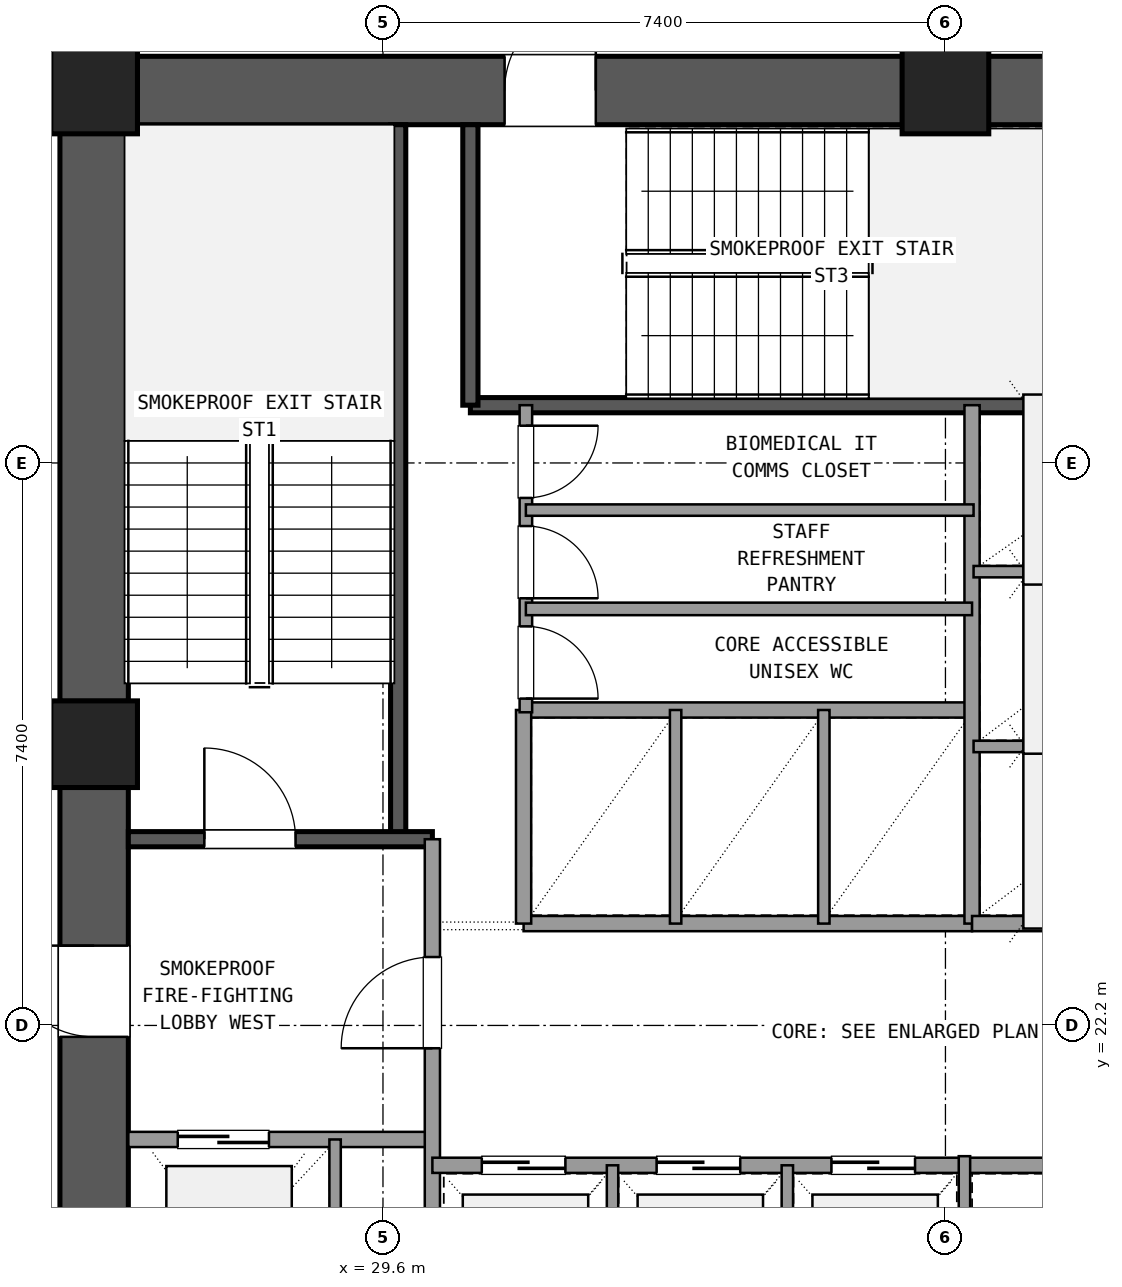
"""IFC4 building model, lengths in metres.
Left out: names, types, materials, properties, quantities, classifications, styles, units other than length and angle.
Written with IfcOpenShell. Run it as: python <this file> out.ifc"""

import sys

from ifc_helpers import new_model, si_unit, direction, frame, frame_2d, origin, origin_2d, place, context, subcontext, project, spatial, rectangle, extrude, element, fill, save


model = new_model("IFC4")
c1 = context("Model", 3, precision=1e-05, world=origin(), true_north=direction((0.0, 1.0)))
c2 = subcontext(c1, "Body", "Model", "MODEL_VIEW")
j1 = project(units=[si_unit("LENGTHUNIT", "METRE"), si_unit("PLANEANGLEUNIT", "RADIAN")], contexts=[c1])
p1 = place(None, origin())
s1 = spatial("IfcSite", under=j1, at=p1, CompositionType="ELEMENT")
p2 = place(p1, origin())
s2 = spatial("IfcBuilding", under=s1, at=p2, CompositionType="ELEMENT")
p3 = place(p2, frame((0.0, 0.0, 9.9)))
s3 = spatial("IfcBuildingStorey", under=s2, at=p3, CompositionType="ELEMENT", Elevation=9.9)
for number, where, z_axis, x_axis in (
    (1, (37.0, 34.5, 0.0), (0.0, 0.0, 1.0), (1.0, 0.0, 0.0)),
    (2, (25.8, 34.5, 0.0), (0.0, 0.0, 1.0), (1.0, 0.0, 0.0)),
    (3, (25.8, 25.9, 0.0), (0.0, 0.0, 1.0), (1.0, 0.0, 0.0)),
):
    element("IfcColumn", number, at=place(p3, frame(where, z_axis=z_axis, x_axis=x_axis)), inside=s3, PredefinedType="COLUMN", context=c2, shape_type="SweptSolid", body=[
        extrude(rectangle(XDim=1.14, YDim=1.14, at=origin_2d()), origin(), (0.0, 0.0, 1.0), 4.5),
    ])
p4 = place(p3, frame((47.635, 34.5, 0.0), z_axis=(0.0, 0.0, 1.0), x_axis=(-1.0, 0.0, 0.0)))
e4 = element("IfcWall", 4, at=p4, inside=s3, PredefinedType="SHEAR", context=c2, shape_type="SweptSolid", body=[
    extrude(rectangle(XDim=10.07, YDim=0.9, at=frame_2d((5.035, 0.0))), origin(), (0.0, 0.0, 1.0), 4.2),
])
p5 = place(p4, frame((4.535, 0.0, 0.0)))
e5 = element("IfcOpeningElement", 5, at=p5, cuts=e4, PredefinedType="OPENING", context=c2, shape_type="SweptSolid", body=[
    extrude(rectangle(XDim=1.6, YDim=2.2, at=frame_2d((0.8, 1.1))), frame((0.0, 0.46, 0.0), z_axis=(0.0, -1.0, 0.0), x_axis=(1.0, 0.0, 0.0)), (0.0, 0.0, 1.0), 0.92),
])
p6 = place(p3, frame((36.435, 34.5, 0.0), z_axis=(0.0, 0.0, 1.0), x_axis=(-1.0, 0.0, 0.0)))
e6 = element("IfcWall", 6, at=p6, inside=s3, PredefinedType="SHEAR", context=c2, shape_type="SweptSolid", body=[
    extrude(rectangle(XDim=10.07, YDim=0.9, at=frame_2d((5.035, 0.0))), origin(), (0.0, 0.0, 1.0), 4.2),
])
p7 = place(p6, frame((4.035, 0.0, 0.0)))
e7 = element("IfcOpeningElement", 7, at=p7, cuts=e6, PredefinedType="OPENING", context=c2, shape_type="SweptSolid", body=[
    extrude(rectangle(XDim=1.2, YDim=2.15, at=frame_2d((0.6, 1.075))), frame((0.0, 0.46, 0.0), z_axis=(0.0, -1.0, 0.0), x_axis=(1.0, 0.0, 0.0)), (0.0, 0.0, 1.0), 0.92),
])
p8 = place(p3, frame((25.8, 33.935, 0.0), z_axis=(0.0, 0.0, 1.0), x_axis=(0.0, -1.0, 0.0)))
e8 = element("IfcWall", 8, at=p8, inside=s3, PredefinedType="SHEAR", context=c2, shape_type="SweptSolid", body=[
    extrude(rectangle(XDim=7.47, YDim=0.9, at=frame_2d((3.735, 0.0))), origin(), (0.0, 0.0, 1.0), 4.2),
])
p9 = place(p3, frame((25.8, 25.335, 0.0), z_axis=(0.0, 0.0, 1.0), x_axis=(0.0, -1.0, 0.0)))
e9 = element("IfcWall", 9, at=p9, inside=s3, PredefinedType="SHEAR", context=c2, shape_type="SweptSolid", body=[
    extrude(rectangle(XDim=7.47, YDim=0.9, at=frame_2d((3.735, 0.0))), origin(), (0.0, 0.0, 1.0), 4.2),
])
p10 = place(p9, frame((2.085, 0.0, 0.0)))
e10 = element("IfcOpeningElement", 10, at=p10, cuts=e9, PredefinedType="OPENING", context=c2, shape_type="SweptSolid", body=[
    extrude(rectangle(XDim=1.2, YDim=2.15, at=frame_2d((0.6, 1.075))), frame((0.0, 0.46, 0.0), z_axis=(0.0, -1.0, 0.0), x_axis=(1.0, 0.0, 0.0)), (0.0, 0.0, 1.0), 0.92),
])
p11 = place(p3, frame((29.8, 24.65, 0.0), z_axis=(0.0, 0.0, 1.0), x_axis=(0.0, 1.0, 0.0)))
e11 = element("IfcWall", 11, at=p11, inside=s3, PredefinedType="SHEAR", context=c2, shape_type="SweptSolid", body=[
    extrude(rectangle(XDim=9.4, YDim=0.2, at=frame_2d((4.7, 0.0))), origin(), (0.0, 0.0, 1.0), 4.2),
])
p12 = place(p3, frame((26.25, 24.65, 0.0), z_axis=(0.0, 0.0, 1.0), x_axis=(1.0, 0.0, 0.0)))
e12 = element("IfcWall", 12, at=p12, inside=s3, PredefinedType="SHEAR", context=c2, shape_type="SweptSolid", body=[
    extrude(rectangle(XDim=4.0, YDim=0.2, at=frame_2d((2.0, 0.0))), origin(), (0.0, 0.0, 1.0), 4.2),
])
p13 = place(p12, frame((1.0, 0.0, 0.0)))
e13 = element("IfcOpeningElement", 13, at=p13, cuts=e12, PredefinedType="OPENING", context=c2, shape_type="SweptSolid", body=[
    extrude(rectangle(XDim=1.2, YDim=2.15, at=frame_2d((0.6, 1.075))), frame((0.0, 0.11, 0.0), z_axis=(0.0, -1.0, 0.0), x_axis=(1.0, 0.0, 0.0)), (0.0, 0.0, 1.0), 0.22),
])
p14 = place(p3, frame((30.75, 30.36, 0.0), z_axis=(0.0, 0.0, 1.0), x_axis=(1.0, 0.0, 0.0)))
e14 = element("IfcWall", 14, at=p14, inside=s3, PredefinedType="SHEAR", context=c2, shape_type="SweptSolid", body=[
    extrude(rectangle(XDim=9.5, YDim=0.2, at=frame_2d((4.75, 0.0))), origin(), (0.0, 0.0, 1.0), 4.2),
])
p15 = place(p3, frame((30.75, 30.36, 0.0), z_axis=(0.0, 0.0, 1.0), x_axis=(0.0, 1.0, 0.0)))
e15 = element("IfcWall", 15, at=p15, inside=s3, PredefinedType="SHEAR", context=c2, shape_type="SweptSolid", body=[
    extrude(rectangle(XDim=3.69, YDim=0.2, at=frame_2d((1.845, 0.0))), origin(), (0.0, 0.0, 1.0), 4.2),
])
p16 = place(p3, frame((26.25, 20.7, 0.0), z_axis=(0.0, 0.0, 1.0), x_axis=(1.0, 0.0, 0.0)))
e16 = element("IfcWall", 16, at=p16, inside=s3, PredefinedType="SOLIDWALL", context=c2, shape_type="SweptSolid", body=[
    extrude(rectangle(XDim=4.0, YDim=0.2, at=frame_2d((2.0, 0.0))), origin(), (0.0, 0.0, 1.0), 3.21),
])
p17 = place(p16, frame((0.65, 0.0, 0.0)))
e17 = element("IfcOpeningElement", 17, at=p17, cuts=e16, PredefinedType="OPENING", context=c2, shape_type="SweptSolid", body=[
    extrude(rectangle(XDim=1.2, YDim=2.15, at=frame_2d((0.6, 1.075))), frame((0.0, 0.11, 0.0), z_axis=(0.0, -1.0, 0.0), x_axis=(1.0, 0.0, 0.0)), (0.0, 0.0, 1.0), 0.22),
])
p18 = place(p3, frame((30.25, 17.75, 0.0), z_axis=(0.0, 0.0, 1.0), x_axis=(0.0, 1.0, 0.0)))
e18 = element("IfcWall", 18, at=p18, inside=s3, PredefinedType="SOLIDWALL", context=c2, shape_type="SweptSolid", body=[
    extrude(rectangle(XDim=6.9, YDim=0.2, at=frame_2d((3.45, 0.0))), origin(), (0.0, 0.0, 1.0), 3.21),
])
p19 = place(p18, frame((4.15, 0.0, 0.0)))
e19 = element("IfcOpeningElement", 19, at=p19, cuts=e18, PredefinedType="OPENING", context=c2, shape_type="SweptSolid", body=[
    extrude(rectangle(XDim=1.2, YDim=2.15, at=frame_2d((0.6, 1.075))), frame((0.0, 0.11, 0.0), z_axis=(0.0, -1.0, 0.0), x_axis=(1.0, 0.0, 0.0)), (0.0, 0.0, 1.0), 0.22),
])
p20 = place(p3, frame((28.97, 17.75, 0.0), z_axis=(0.0, 0.0, 1.0), x_axis=(0.0, 1.0, 0.0)))
e20 = element("IfcWall", 20, at=p20, inside=s3, PredefinedType="PARTITIONING", context=c2, shape_type="SweptSolid", body=[
    extrude(rectangle(XDim=2.95, YDim=0.15, at=frame_2d((1.475, 0.0))), origin(), (0.0, 0.0, 1.0), 3.21),
])
p21 = place(p3, frame((30.25, 20.36, 0.0), z_axis=(0.0, 0.0, 1.0), x_axis=(1.0, 0.0, 0.0)))
e21 = element("IfcWall", 21, at=p21, inside=s3, PredefinedType="SOLIDWALL", context=c2, shape_type="SweptSolid", body=[
    extrude(rectangle(XDim=7.0, YDim=0.2, at=frame_2d((3.5, 0.0))), origin(), (0.0, 0.0, 1.0), 3.21),
])
p22 = place(p21, frame((0.65, 0.0, 0.0)))
e22 = element("IfcOpeningElement", 22, at=p22, cuts=e21, PredefinedType="OPENING", context=c2, shape_type="SweptSolid", body=[
    extrude(rectangle(XDim=1.1, YDim=2.15, at=frame_2d((0.55, 1.075))), frame((0.0, 0.11, 0.0), z_axis=(0.0, -1.0, 0.0), x_axis=(1.0, 0.0, 0.0)), (0.0, 0.0, 1.0), 0.22),
])
p23 = place(p21, frame((2.95, 0.0, 0.0)))
e23 = element("IfcOpeningElement", 23, at=p23, cuts=e21, PredefinedType="OPENING", context=c2, shape_type="SweptSolid", body=[
    extrude(rectangle(XDim=1.1, YDim=2.15, at=frame_2d((0.55, 1.075))), frame((0.0, 0.11, 0.0), z_axis=(0.0, -1.0, 0.0), x_axis=(1.0, 0.0, 0.0)), (0.0, 0.0, 1.0), 0.22),
])
p24 = place(p21, frame((5.25, 0.0, 0.0)))
e24 = element("IfcOpeningElement", 24, at=p24, cuts=e21, PredefinedType="OPENING", context=c2, shape_type="SweptSolid", body=[
    extrude(rectangle(XDim=1.1, YDim=2.15, at=frame_2d((0.55, 1.075))), frame((0.0, 0.11, 0.0), z_axis=(0.0, -1.0, 0.0), x_axis=(1.0, 0.0, 0.0)), (0.0, 0.0, 1.0), 0.22),
])
for number, where, z_axis, x_axis in (
    (25, (32.62, 17.75, 0.0), (0.0, 0.0, 1.0), (0.0, 1.0, 0.0)),
    (26, (34.92, 17.75, 0.0), (0.0, 0.0, 1.0), (0.0, 1.0, 0.0)),
):
    element("IfcWall", number, at=place(p3, frame(where, z_axis=z_axis, x_axis=x_axis)), inside=s3, PredefinedType="PARTITIONING", context=c2, shape_type="SweptSolid", body=[
        extrude(rectangle(XDim=2.61, YDim=0.15, at=frame_2d((1.305, 0.0))), origin(), (0.0, 0.0, 1.0), 3.21),
    ])
p25 = place(p3, frame((37.25, 20.36, 0.0), z_axis=(0.0, 0.0, 1.0), x_axis=(1.0, 0.0, 0.0)))
e27 = element("IfcWall", 27, at=p25, inside=s3, PredefinedType="SOLIDWALL", context=c2, shape_type="SweptSolid", body=[
    extrude(rectangle(XDim=6.1, YDim=0.2, at=frame_2d((3.05, 0.0))), origin(), (0.0, 0.0, 1.0), 3.21),
])
p26 = place(p3, frame((37.25, 17.75, 0.0), z_axis=(0.0, 0.0, 1.0), x_axis=(0.0, 1.0, 0.0)))
e28 = element("IfcWall", 28, at=p26, inside=s3, PredefinedType="PARTITIONING", context=c2, shape_type="SweptSolid", body=[
    extrude(rectangle(XDim=2.73, YDim=0.15, at=frame_2d((1.365, 0.0))), origin(), (0.0, 0.0, 1.0), 3.21),
])
for number, where, z_axis, x_axis in (
    (29, (31.45, 23.54, 0.0), (0.0, 0.0, 1.0), (1.0, 0.0, 0.0)),
    (30, (31.45, 26.35, 0.0), (0.0, 0.0, 1.0), (1.0, 0.0, 0.0)),
):
    element("IfcWall", number, at=place(p3, frame(where, z_axis=z_axis, x_axis=x_axis)), inside=s3, PredefinedType="SOLIDWALL", context=c2, shape_type="SweptSolid", body=[
        extrude(rectangle(XDim=5.9, YDim=0.2, at=frame_2d((2.95, 0.0))), origin(), (0.0, 0.0, 1.0), 3.21),
    ])
p27 = place(p3, frame((31.45, 23.54, 0.0), z_axis=(0.0, 0.0, 1.0), x_axis=(0.0, 1.0, 0.0)))
e31 = element("IfcWall", 31, at=p27, inside=s3, PredefinedType="SOLIDWALL", context=c2, shape_type="SweptSolid", body=[
    extrude(rectangle(XDim=2.81, YDim=0.2, at=frame_2d((1.405, 0.0))), origin(), (0.0, 0.0, 1.0), 3.21),
])
for number, where, z_axis, x_axis in (
    (32, (33.45, 23.54, 0.0), (0.0, 0.0, 1.0), (0.0, 1.0, 0.0)),
    (33, (35.4, 23.54, 0.0), (0.0, 0.0, 1.0), (0.0, 1.0, 0.0)),
):
    element("IfcWall", number, at=place(p3, frame(where, z_axis=z_axis, x_axis=x_axis)), inside=s3, PredefinedType="PARTITIONING", context=c2, shape_type="SweptSolid", body=[
        extrude(rectangle(XDim=2.81, YDim=0.15, at=frame_2d((1.405, 0.0))), origin(), (0.0, 0.0, 1.0), 3.21),
    ])
p28 = place(p3, frame((37.35, 23.54, 0.0), z_axis=(0.0, 0.0, 1.0), x_axis=(0.0, 1.0, 0.0)))
e34 = element("IfcWall", 34, at=p28, inside=s3, PredefinedType="SOLIDWALL", context=c2, shape_type="SweptSolid", body=[
    extrude(rectangle(XDim=6.82, YDim=0.2, at=frame_2d((3.41, 0.0))), origin(), (0.0, 0.0, 1.0), 3.21),
])
p29 = place(p3, frame((37.35, 23.54, 0.0), z_axis=(0.0, 0.0, 1.0), x_axis=(1.0, 0.0, 0.0)))
e35 = element("IfcWall", 35, at=p29, inside=s3, PredefinedType="SOLIDWALL", context=c2, shape_type="SweptSolid", body=[
    extrude(rectangle(XDim=3.05, YDim=0.2, at=frame_2d((1.525, 0.0))), origin(), (0.0, 0.0, 1.0), 3.21),
])
for number, where, z_axis, x_axis in (
    (36, (37.37, 25.87, 0.0), (0.0, 0.0, 1.0), (1.0, 0.0, 0.0)),
    (37, (37.37, 28.17, 0.0), (0.0, 0.0, 1.0), (1.0, 0.0, 0.0)),
):
    element("IfcWall", number, at=place(p3, frame(where, z_axis=z_axis, x_axis=x_axis)), inside=s3, PredefinedType="PARTITIONING", context=c2, shape_type="SweptSolid", body=[
        extrude(rectangle(XDim=3.01, YDim=0.15, at=frame_2d((1.505, 0.0))), origin(), (0.0, 0.0, 1.0), 3.21),
    ])
p30 = place(p3, frame((31.48, 26.32, 0.0), z_axis=(0.0, 0.0, 1.0), x_axis=(0.0, 1.0, 0.0)))
e38 = element("IfcWall", 38, at=p30, inside=s3, PredefinedType="PLUMBINGWALL", context=c2, shape_type="SweptSolid", body=[
    extrude(rectangle(XDim=4.04, YDim=0.165, at=frame_2d((2.02, 0.0))), origin(), (0.0, 0.0, 1.0), 3.21),
])
p31 = place(p30, frame((0.18, 0.0, 0.0)))
e39 = element("IfcOpeningElement", 39, at=p31, cuts=e38, PredefinedType="OPENING", context=c2, shape_type="SweptSolid", body=[
    extrude(rectangle(XDim=0.95, YDim=2.1, at=frame_2d((0.475, 1.05))), frame((0.0, 0.093, 0.0), z_axis=(0.0, -1.0, 0.0), x_axis=(1.0, 0.0, 0.0)), (0.0, 0.0, 1.0), 0.185),
])
p32 = place(p30, frame((1.5, 0.0, 0.0)))
e40 = element("IfcOpeningElement", 40, at=p32, cuts=e38, PredefinedType="OPENING", context=c2, shape_type="SweptSolid", body=[
    extrude(rectangle(XDim=0.95, YDim=2.1, at=frame_2d((0.475, 1.05))), frame((0.0, 0.093, 0.0), z_axis=(0.0, -1.0, 0.0), x_axis=(1.0, 0.0, 0.0)), (0.0, 0.0, 1.0), 0.185),
])
p33 = place(p30, frame((2.82, 0.0, 0.0)))
e41 = element("IfcOpeningElement", 41, at=p33, cuts=e38, PredefinedType="OPENING", context=c2, shape_type="SweptSolid", body=[
    extrude(rectangle(XDim=0.95, YDim=2.1, at=frame_2d((0.475, 1.05))), frame((0.0, 0.093, 0.0), z_axis=(0.0, -1.0, 0.0), x_axis=(1.0, 0.0, 0.0)), (0.0, 0.0, 1.0), 0.185),
])
p34 = place(p3, frame((31.48, 27.68, 0.0), z_axis=(0.0, 0.0, 1.0), x_axis=(1.0, 0.0, 0.0)))
e42 = element("IfcWall", 42, at=p34, inside=s3, PredefinedType="PLUMBINGWALL", context=c2, shape_type="SweptSolid", body=[
    extrude(rectangle(XDim=5.87, YDim=0.165, at=frame_2d((2.935, 0.0))), origin(), (0.0, 0.0, 1.0), 3.21),
])
p35 = place(p3, frame((31.48, 28.98, 0.0), z_axis=(0.0, 0.0, 1.0), x_axis=(1.0, 0.0, 0.0)))
e43 = element("IfcWall", 43, at=p35, inside=s3, PredefinedType="PARTITIONING", context=c2, shape_type="SweptSolid", body=[
    extrude(rectangle(XDim=5.89, YDim=0.15, at=frame_2d((2.945, 0.0))), origin(), (0.0, 0.0, 1.0), 3.21),
])
p36 = place(p13, origin())
e44 = element("IfcDoor", 44, at=p36, inside=s3, OperationType="SINGLE_SWING_LEFT", PredefinedType="DOOR", context=c2, shape_type="SweptSolid", body=[
    extrude(rectangle(XDim=1.2, YDim=2.15, at=frame_2d((0.6, 1.075))), frame((0.0, 0.025, 0.0), z_axis=(0.0, -1.0, 0.0), x_axis=(1.0, 0.0, 0.0)), (0.0, 0.0, 1.0), 0.05),
])
fill(e13, e44)
p37 = place(p17, origin())
e45 = element("IfcDoor", 45, at=p37, inside=s3, OperationType="SLIDING_TO_LEFT", PredefinedType="DOOR", context=c2, shape_type="SweptSolid", body=[
    extrude(rectangle(XDim=1.2, YDim=2.15, at=frame_2d((0.6, 1.075))), frame((0.0, 0.025, 0.0), z_axis=(0.0, -1.0, 0.0), x_axis=(1.0, 0.0, 0.0)), (0.0, 0.0, 1.0), 0.05),
])
fill(e17, e45)
p38 = place(p19, origin())
e46 = element("IfcDoor", 46, at=p38, inside=s3, OperationType="SINGLE_SWING_LEFT", PredefinedType="DOOR", context=c2, shape_type="SweptSolid", body=[
    extrude(rectangle(XDim=1.2, YDim=2.15, at=frame_2d((0.6, 1.075))), frame((0.0, 0.025, 0.0), z_axis=(0.0, -1.0, 0.0), x_axis=(1.0, 0.0, 0.0)), (0.0, 0.0, 1.0), 0.05),
])
fill(e19, e46)
p39 = place(p10, frame((1.2, 0.0, 0.0), z_axis=(0.0, 0.0, 1.0), x_axis=(-1.0, 0.0, 0.0)))
e47 = element("IfcDoor", 47, at=p39, inside=s3, OperationType="SINGLE_SWING_LEFT", PredefinedType="DOOR", context=c2, shape_type="SweptSolid", body=[
    extrude(rectangle(XDim=1.2, YDim=2.15, at=frame_2d((0.6, 1.075))), frame((0.0, 0.025, 0.0), z_axis=(0.0, -1.0, 0.0), x_axis=(1.0, 0.0, 0.0)), (0.0, 0.0, 1.0), 0.05),
])
fill(e10, e47)
p40 = place(p7, frame((1.2, 0.0, 0.0), z_axis=(0.0, 0.0, 1.0), x_axis=(-1.0, 0.0, 0.0)))
e48 = element("IfcDoor", 48, at=p40, inside=s3, OperationType="SINGLE_SWING_LEFT", PredefinedType="DOOR", context=c2, shape_type="SweptSolid", body=[
    extrude(rectangle(XDim=1.2, YDim=2.15, at=frame_2d((0.6, 1.075))), frame((0.0, 0.025, 0.0), z_axis=(0.0, -1.0, 0.0), x_axis=(1.0, 0.0, 0.0)), (0.0, 0.0, 1.0), 0.05),
])
fill(e7, e48)
p41 = place(p22, origin())
e49 = element("IfcDoor", 49, at=p41, inside=s3, OperationType="SLIDING_TO_LEFT", PredefinedType="DOOR", context=c2, shape_type="SweptSolid", body=[
    extrude(rectangle(XDim=1.1, YDim=2.15, at=frame_2d((0.55, 1.075))), frame((0.0, 0.025, 0.0), z_axis=(0.0, -1.0, 0.0), x_axis=(1.0, 0.0, 0.0)), (0.0, 0.0, 1.0), 0.05),
])
fill(e22, e49)
p42 = place(p23, origin())
e50 = element("IfcDoor", 50, at=p42, inside=s3, OperationType="SLIDING_TO_LEFT", PredefinedType="DOOR", context=c2, shape_type="SweptSolid", body=[
    extrude(rectangle(XDim=1.1, YDim=2.15, at=frame_2d((0.55, 1.075))), frame((0.0, 0.025, 0.0), z_axis=(0.0, -1.0, 0.0), x_axis=(1.0, 0.0, 0.0)), (0.0, 0.0, 1.0), 0.05),
])
fill(e23, e50)
p43 = place(p24, origin())
e51 = element("IfcDoor", 51, at=p43, inside=s3, OperationType="SLIDING_TO_LEFT", PredefinedType="DOOR", context=c2, shape_type="SweptSolid", body=[
    extrude(rectangle(XDim=1.1, YDim=2.15, at=frame_2d((0.55, 1.075))), frame((0.0, 0.025, 0.0), z_axis=(0.0, -1.0, 0.0), x_axis=(1.0, 0.0, 0.0)), (0.0, 0.0, 1.0), 0.05),
])
fill(e24, e51)
p44 = place(p31, frame((0.95, 0.0, 0.0), z_axis=(0.0, 0.0, 1.0), x_axis=(-1.0, 0.0, 0.0)))
e52 = element("IfcDoor", 52, at=p44, inside=s3, OperationType="SINGLE_SWING_LEFT", PredefinedType="DOOR", context=c2, shape_type="SweptSolid", body=[
    extrude(rectangle(XDim=0.95, YDim=2.1, at=frame_2d((0.475, 1.05))), frame((0.0, 0.025, 0.0), z_axis=(0.0, -1.0, 0.0), x_axis=(1.0, 0.0, 0.0)), (0.0, 0.0, 1.0), 0.05),
])
fill(e39, e52)
p45 = place(p32, frame((0.95, 0.0, 0.0), z_axis=(0.0, 0.0, 1.0), x_axis=(-1.0, 0.0, 0.0)))
e53 = element("IfcDoor", 53, at=p45, inside=s3, OperationType="SINGLE_SWING_LEFT", PredefinedType="DOOR", context=c2, shape_type="SweptSolid", body=[
    extrude(rectangle(XDim=0.95, YDim=2.1, at=frame_2d((0.475, 1.05))), frame((0.0, 0.025, 0.0), z_axis=(0.0, -1.0, 0.0), x_axis=(1.0, 0.0, 0.0)), (0.0, 0.0, 1.0), 0.05),
])
fill(e40, e53)
p46 = place(p33, frame((0.95, 0.0, 0.0), z_axis=(0.0, 0.0, 1.0), x_axis=(-1.0, 0.0, 0.0)))
e54 = element("IfcDoor", 54, at=p46, inside=s3, OperationType="SINGLE_SWING_RIGHT", PredefinedType="DOOR", context=c2, shape_type="SweptSolid", body=[
    extrude(rectangle(XDim=0.95, YDim=2.1, at=frame_2d((0.475, 1.05))), frame((0.0, 0.025, 0.0), z_axis=(0.0, -1.0, 0.0), x_axis=(1.0, 0.0, 0.0)), (0.0, 0.0, 1.0), 0.05),
])
fill(e41, e54)
save(model, sys.argv[1])
